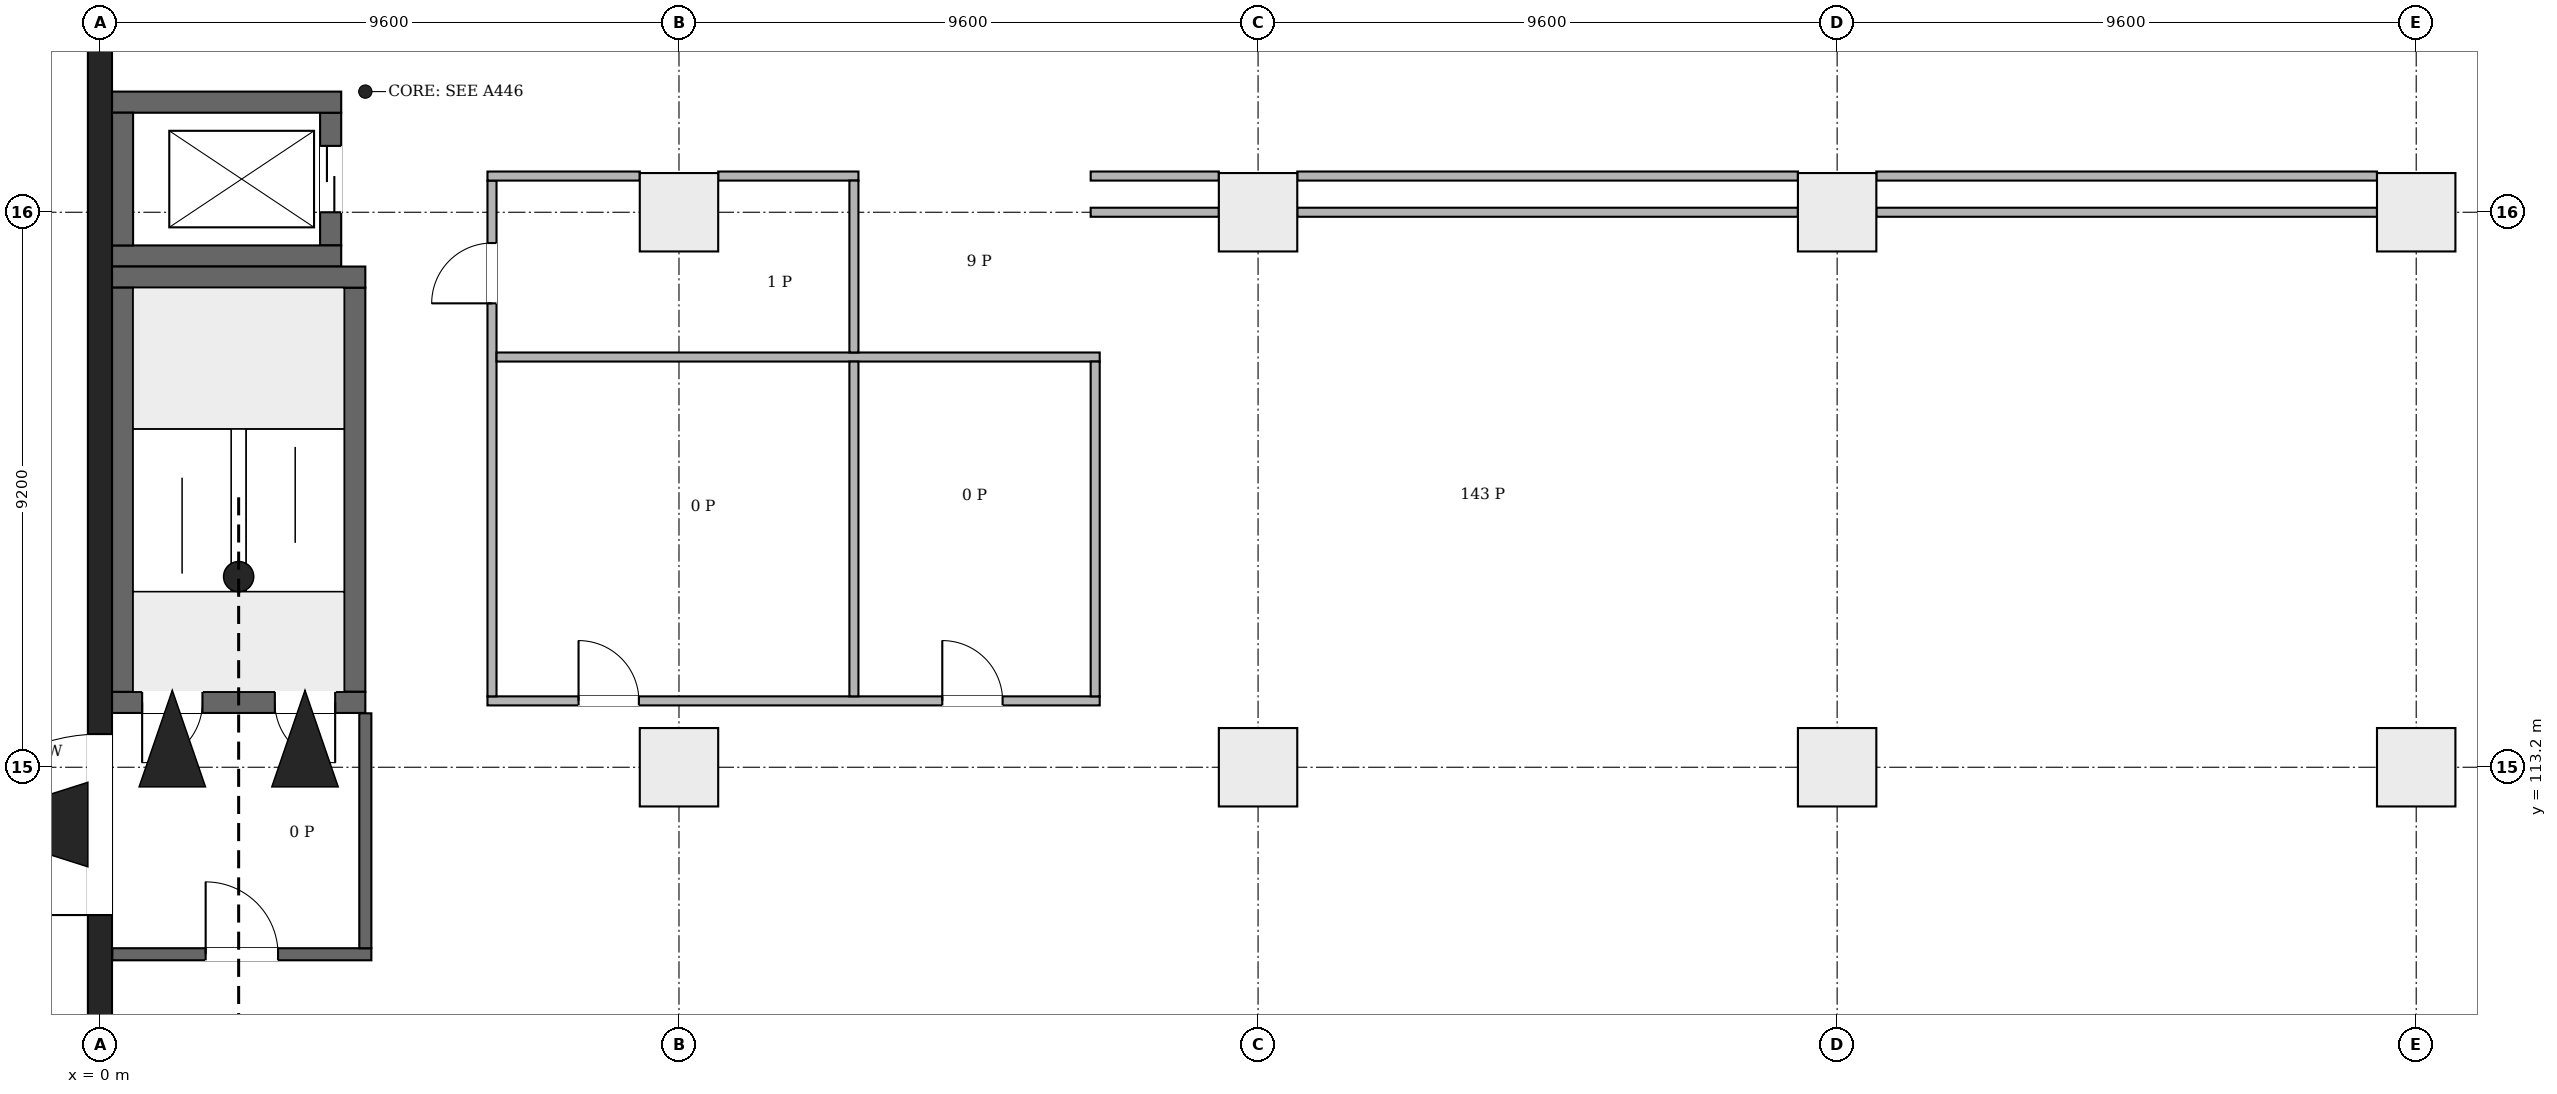
"""IFC4 building model, lengths in metres.
Left out: names, types, materials, properties, quantities, classifications, styles, units other than length and angle.
Written with IfcOpenShell. Run it as: python <this file> out.ifc"""

import sys

from ifc_helpers import new_model, si_unit, direction, frame, frame_2d, origin, origin_2d, place, context, subcontext, project, spatial, rectangle, extrude, element, fill, save


model = new_model("IFC4")
c1 = context("Model", 3, precision=1e-05, world=origin(), true_north=direction((0.0, 1.0)))
c2 = subcontext(c1, "Body", "Model", "MODEL_VIEW")
j1 = project(units=[si_unit("LENGTHUNIT", "METRE"), si_unit("PLANEANGLEUNIT", "RADIAN")], contexts=[c1])
p1 = place(None, origin())
s1 = spatial("IfcSite", under=j1, at=p1, CompositionType="ELEMENT")
p2 = place(p1, origin())
s2 = spatial("IfcBuilding", under=s1, at=p2, CompositionType="ELEMENT")
p3 = place(p2, origin())
s3 = spatial("IfcBuildingStorey", under=s2, at=p3, CompositionType="ELEMENT", Elevation=0.0)
p4 = place(p3, frame((0.0, 94.12, 0.0), z_axis=(0.0, 0.0, 1.0), x_axis=(0.0, 1.0, 0.0)))
e1 = element("IfcWall", 1, at=p4, inside=s3, PredefinedType="SHEAR", context=c2, shape_type="SweptSolid", body=[
    extrude(rectangle(XDim=46.88, YDim=0.4, at=frame_2d((23.44, 0.0))), origin(), (0.0, 0.0, 1.0), 6.5),
])
p5 = place(p4, frame((16.63, 0.0, 0.0)))
e2 = element("IfcOpeningElement", 2, at=p5, cuts=e1, PredefinedType="OPENING", context=c2, shape_type="SweptSolid", body=[
    extrude(rectangle(XDim=3.0, YDim=2.4, at=frame_2d((1.5, 1.2))), frame((0.0, 0.21, 0.0), z_axis=(0.0, -1.0, 0.0), x_axis=(1.0, 0.0, 0.0)), (0.0, 0.0, 1.0), 0.42),
])
p6 = place(p3, frame((0.2, 114.275, 0.0), z_axis=(0.0, 0.0, 1.0), x_axis=(1.0, 0.0, 0.0)))
e3 = element("IfcWall", 3, at=p6, inside=s3, PredefinedType="SHEAR", context=c2, shape_type="SweptSolid", body=[
    extrude(rectangle(XDim=4.2, YDim=0.35, at=frame_2d((2.1, 0.0))), origin(), (0.0, 0.0, 1.0), 6.5),
])
p7 = place(p6, frame((0.5, 0.0, 0.0)))
e4 = element("IfcOpeningElement", 4, at=p7, cuts=e3, PredefinedType="OPENING", context=c2, shape_type="SweptSolid", body=[
    extrude(rectangle(XDim=1.0, YDim=2.1, at=frame_2d((0.5, 1.05))), frame((0.0, 0.185, 0.0), z_axis=(0.0, -1.0, 0.0), x_axis=(1.0, 0.0, 0.0)), (0.0, 0.0, 1.0), 0.37),
])
p8 = place(p6, frame((2.7, 0.0, 0.0)))
e5 = element("IfcOpeningElement", 5, at=p8, cuts=e3, PredefinedType="OPENING", context=c2, shape_type="SweptSolid", body=[
    extrude(rectangle(XDim=1.0, YDim=2.1, at=frame_2d((0.5, 1.05))), frame((0.0, 0.185, 0.0), z_axis=(0.0, -1.0, 0.0), x_axis=(1.0, 0.0, 0.0)), (0.0, 0.0, 1.0), 0.37),
])
p9 = place(p3, frame((0.2, 121.325, 0.0), z_axis=(0.0, 0.0, 1.0), x_axis=(1.0, 0.0, 0.0)))
e6 = element("IfcWall", 6, at=p9, inside=s3, PredefinedType="SHEAR", context=c2, shape_type="SweptSolid", body=[
    extrude(rectangle(XDim=4.2, YDim=0.35, at=frame_2d((2.1, 0.0))), origin(), (0.0, 0.0, 1.0), 6.5),
])
for number, where, z_axis, x_axis in (
    (7, (0.375, 114.45, 0.0), (0.0, 0.0, 1.0), (0.0, 1.0, 0.0)),
    (8, (4.225, 114.45, 0.0), (0.0, 0.0, 1.0), (0.0, 1.0, 0.0)),
):
    element("IfcWall", number, at=place(p3, frame(where, z_axis=z_axis, x_axis=x_axis)), inside=s3, PredefinedType="SHEAR", context=c2, shape_type="SweptSolid", body=[
        extrude(rectangle(XDim=6.7, YDim=0.35, at=frame_2d((3.35, 0.0))), origin(), (0.0, 0.0, 1.0), 6.5),
    ])
for number, where, z_axis, x_axis in (
    (9, (0.2, 121.675, 0.0), (0.0, 0.0, 1.0), (1.0, 0.0, 0.0)),
    (10, (0.2, 124.225, 0.0), (0.0, 0.0, 1.0), (1.0, 0.0, 0.0)),
):
    element("IfcWall", number, at=place(p3, frame(where, z_axis=z_axis, x_axis=x_axis)), inside=s3, PredefinedType="SHEAR", context=c2, shape_type="SweptSolid", body=[
        extrude(rectangle(XDim=3.8, YDim=0.35, at=frame_2d((1.9, 0.0))), origin(), (0.0, 0.0, 1.0), 6.5),
    ])
p10 = place(p3, frame((0.375, 121.85, 0.0), z_axis=(0.0, 0.0, 1.0), x_axis=(0.0, 1.0, 0.0)))
e11 = element("IfcWall", 11, at=p10, inside=s3, PredefinedType="SHEAR", context=c2, shape_type="SweptSolid", body=[
    extrude(rectangle(XDim=2.2, YDim=0.35, at=frame_2d((1.1, 0.0))), origin(), (0.0, 0.0, 1.0), 6.5),
])
p11 = place(p3, frame((3.825, 121.85, 0.0), z_axis=(0.0, 0.0, 1.0), x_axis=(0.0, 1.0, 0.0)))
e12 = element("IfcWall", 12, at=p11, inside=s3, PredefinedType="SHEAR", context=c2, shape_type="SweptSolid", body=[
    extrude(rectangle(XDim=2.2, YDim=0.35, at=frame_2d((1.1, 0.0))), origin(), (0.0, 0.0, 1.0), 6.5),
])
p12 = place(p11, frame((0.55, 0.0, 0.0)))
e13 = element("IfcOpeningElement", 13, at=p12, cuts=e12, PredefinedType="OPENING", context=c2, shape_type="SweptSolid", body=[
    extrude(rectangle(XDim=1.1, YDim=2.1, at=frame_2d((0.55, 1.05))), frame((0.0, 0.185, 0.0), z_axis=(0.0, -1.0, 0.0), x_axis=(1.0, 0.0, 0.0)), (0.0, 0.0, 1.0), 0.37),
])
for number, where, z_axis, x_axis in (
    (14, (9.6, 113.2, 0.0), (0.0, 0.0, 1.0), (1.0, 0.0, 0.0)),
    (15, (19.2, 113.2, 0.0), (0.0, 0.0, 1.0), (1.0, 0.0, 0.0)),
    (16, (28.8, 113.2, 0.0), (0.0, 0.0, 1.0), (1.0, 0.0, 0.0)),
    (17, (38.4, 113.2, 0.0), (0.0, 0.0, 1.0), (1.0, 0.0, 0.0)),
    (18, (9.6, 122.4, 0.0), (0.0, 0.0, 1.0), (1.0, 0.0, 0.0)),
    (19, (19.2, 122.4, 0.0), (0.0, 0.0, 1.0), (1.0, 0.0, 0.0)),
    (20, (28.8, 122.4, 0.0), (0.0, 0.0, 1.0), (1.0, 0.0, 0.0)),
    (21, (38.4, 122.4, 0.0), (0.0, 0.0, 1.0), (1.0, 0.0, 0.0)),
):
    element("IfcColumn", number, at=place(p3, frame(where, z_axis=z_axis, x_axis=x_axis)), inside=s3, PredefinedType="COLUMN", context=c2, shape_type="SweptSolid", body=[
        extrude(rectangle(XDim=1.3, YDim=1.3, at=origin_2d()), origin(), (0.0, 0.0, 1.0), 6.5),
    ])
p13 = place(p3, frame((0.206, 110.1, 0.0), z_axis=(0.0, 0.0, 1.0), x_axis=(1.0, 0.0, 0.0)))
e22 = element("IfcWall", 22, at=p13, inside=s3, PredefinedType="PARTITIONING", context=c2, shape_type="SweptSolid", body=[
    extrude(rectangle(XDim=4.294, YDim=0.2, at=frame_2d((2.147, 0.0))), origin(), (0.0, 0.0, 1.0), 6.15),
])
p14 = place(p13, frame((1.547, 0.0, 0.0)))
e23 = element("IfcOpeningElement", 23, at=p14, cuts=e22, PredefinedType="OPENING", context=c2, shape_type="SweptSolid", body=[
    extrude(rectangle(XDim=1.2, YDim=2.1, at=frame_2d((0.6, 1.05))), frame((0.0, 0.11, 0.0), z_axis=(0.0, -1.0, 0.0), x_axis=(1.0, 0.0, 0.0)), (0.0, 0.0, 1.0), 0.22),
])
p15 = place(p3, frame((4.4, 110.2, 0.0), z_axis=(0.0, 0.0, 1.0), x_axis=(0.0, 1.0, 0.0)))
e24 = element("IfcWall", 24, at=p15, inside=s3, PredefinedType="PARTITIONING", context=c2, shape_type="SweptSolid", body=[
    extrude(rectangle(XDim=3.894, YDim=0.2, at=frame_2d((1.947, 0.0))), origin(), (0.0, 0.0, 1.0), 6.15),
])
p16 = place(p3, frame((6.425, 114.3, 0.0), z_axis=(0.0, 0.0, 1.0), x_axis=(1.0, 0.0, 0.0)))
e25 = element("IfcWall", 25, at=p16, inside=s3, PredefinedType="PARTITIONING", context=c2, shape_type="SweptSolid", body=[
    extrude(rectangle(XDim=10.15, YDim=0.15, at=frame_2d((5.075, 0.0))), origin(), (0.0, 0.0, 1.0), 6.15),
])
p17 = place(p16, frame((1.51, 0.0, 0.0)))
e26 = element("IfcOpeningElement", 26, at=p17, cuts=e25, PredefinedType="OPENING", context=c2, shape_type="SweptSolid", body=[
    extrude(rectangle(XDim=1.0, YDim=2.1, at=frame_2d((0.5, 1.05))), frame((0.0, 0.085, 0.0), z_axis=(0.0, -1.0, 0.0), x_axis=(1.0, 0.0, 0.0)), (0.0, 0.0, 1.0), 0.17),
])
p18 = place(p16, frame((7.54, 0.0, 0.0)))
e27 = element("IfcOpeningElement", 27, at=p18, cuts=e25, PredefinedType="OPENING", context=c2, shape_type="SweptSolid", body=[
    extrude(rectangle(XDim=1.0, YDim=2.1, at=frame_2d((0.5, 1.05))), frame((0.0, 0.085, 0.0), z_axis=(0.0, -1.0, 0.0), x_axis=(1.0, 0.0, 0.0)), (0.0, 0.0, 1.0), 0.17),
])
p19 = place(p3, frame((6.5, 114.375, 0.0), z_axis=(0.0, 0.0, 1.0), x_axis=(0.0, 1.0, 0.0)))
e28 = element("IfcWall", 28, at=p19, inside=s3, PredefinedType="PARTITIONING", context=c2, shape_type="SweptSolid", body=[
    extrude(rectangle(XDim=8.55, YDim=0.15, at=frame_2d((4.275, 0.0))), origin(), (0.0, 0.0, 1.0), 6.15),
])
p20 = place(p19, frame((6.515, 0.0, 0.0)))
e29 = element("IfcOpeningElement", 29, at=p20, cuts=e28, PredefinedType="OPENING", context=c2, shape_type="SweptSolid", body=[
    extrude(rectangle(XDim=1.0, YDim=2.1, at=frame_2d((0.5, 1.05))), frame((0.0, 0.085, 0.0), z_axis=(0.0, -1.0, 0.0), x_axis=(1.0, 0.0, 0.0)), (0.0, 0.0, 1.0), 0.17),
])
p21 = place(p3, frame((6.425, 123.0, 0.0), z_axis=(0.0, 0.0, 1.0), x_axis=(1.0, 0.0, 0.0)))
e30 = element("IfcWall", 30, at=p21, inside=s3, PredefinedType="PARTITIONING", context=c2, shape_type="SweptSolid", body=[
    extrude(rectangle(XDim=2.525, YDim=0.15, at=frame_2d((1.262, 0.0))), origin(), (0.0, 0.0, 1.0), 6.15),
])
p22 = place(p3, frame((6.575, 120.0, 0.0), z_axis=(0.0, 0.0, 1.0), x_axis=(1.0, 0.0, 0.0)))
e31 = element("IfcWall", 31, at=p22, inside=s3, PredefinedType="PARTITIONING", context=c2, shape_type="SweptSolid", body=[
    extrude(rectangle(XDim=10.0, YDim=0.15, at=frame_2d((5.0, 0.0))), origin(), (0.0, 0.0, 1.0), 6.15),
])
p23 = place(p3, frame((10.25, 123.0, 0.0), z_axis=(0.0, 0.0, 1.0), x_axis=(1.0, 0.0, 0.0)))
e32 = element("IfcWall", 32, at=p23, inside=s3, PredefinedType="PARTITIONING", context=c2, shape_type="SweptSolid", body=[
    extrude(rectangle(XDim=2.325, YDim=0.15, at=frame_2d((1.163, 0.0))), origin(), (0.0, 0.0, 1.0), 5.75),
])
p24 = place(p3, frame((12.5, 114.375, 0.0), z_axis=(0.0, 0.0, 1.0), x_axis=(0.0, 1.0, 0.0)))
e33 = element("IfcWall", 33, at=p24, inside=s3, PredefinedType="PARTITIONING", context=c2, shape_type="SweptSolid", body=[
    extrude(rectangle(XDim=5.55, YDim=0.15, at=frame_2d((2.775, 0.0))), origin(), (0.0, 0.0, 1.0), 6.15),
])
p25 = place(p3, frame((12.5, 120.075, 0.0), z_axis=(0.0, 0.0, 1.0), x_axis=(0.0, 1.0, 0.0)))
e34 = element("IfcWall", 34, at=p25, inside=s3, PredefinedType="PARTITIONING", context=c2, shape_type="SweptSolid", body=[
    extrude(rectangle(XDim=2.85, YDim=0.15, at=frame_2d((1.425, 0.0))), origin(), (0.0, 0.0, 1.0), 6.15),
])
p26 = place(p3, frame((16.5, 114.375, 0.0), z_axis=(0.0, 0.0, 1.0), x_axis=(0.0, 1.0, 0.0)))
e35 = element("IfcWall", 35, at=p26, inside=s3, PredefinedType="PARTITIONING", context=c2, shape_type="SweptSolid", body=[
    extrude(rectangle(XDim=5.55, YDim=0.15, at=frame_2d((2.775, 0.0))), origin(), (0.0, 0.0, 1.0), 6.15),
])
for number, where, z_axis, x_axis in (
    (36, (16.425, 122.4, 0.0), (0.0, 0.0, 1.0), (1.0, 0.0, 0.0)),
    (37, (16.425, 123.0, 0.0), (0.0, 0.0, 1.0), (1.0, 0.0, 0.0)),
):
    element("IfcWall", number, at=place(p3, frame(where, z_axis=z_axis, x_axis=x_axis)), inside=s3, PredefinedType="PARTITIONING", context=c2, shape_type="SweptSolid", body=[
        extrude(rectangle(XDim=2.125, YDim=0.15, at=frame_2d((1.062, 0.0))), origin(), (0.0, 0.0, 1.0), 5.75),
    ])
for number, where, z_axis, x_axis in (
    (38, (19.85, 122.4, 0.0), (0.0, 0.0, 1.0), (1.0, 0.0, 0.0)),
    (39, (19.85, 123.0, 0.0), (0.0, 0.0, 1.0), (1.0, 0.0, 0.0)),
):
    element("IfcWall", number, at=place(p3, frame(where, z_axis=z_axis, x_axis=x_axis)), inside=s3, PredefinedType="PARTITIONING", context=c2, shape_type="SweptSolid", body=[
        extrude(rectangle(XDim=8.3, YDim=0.15, at=frame_2d((4.15, 0.0))), origin(), (0.0, 0.0, 1.0), 5.75),
    ])
for number, where, z_axis, x_axis in (
    (40, (29.45, 122.4, 0.0), (0.0, 0.0, 1.0), (1.0, 0.0, 0.0)),
    (41, (29.45, 123.0, 0.0), (0.0, 0.0, 1.0), (1.0, 0.0, 0.0)),
):
    element("IfcWall", number, at=place(p3, frame(where, z_axis=z_axis, x_axis=x_axis)), inside=s3, PredefinedType="PARTITIONING", context=c2, shape_type="SweptSolid", body=[
        extrude(rectangle(XDim=8.3, YDim=0.15, at=frame_2d((4.15, 0.0))), origin(), (0.0, 0.0, 1.0), 5.75),
    ])
p27 = place(p5, origin())
e42 = element("IfcDoor", 42, at=p27, inside=s3, OperationType="DOUBLE_DOOR_SINGLE_SWING", PredefinedType="DOOR", context=c2, shape_type="SweptSolid", body=[
    extrude(rectangle(XDim=3.0, YDim=2.4, at=frame_2d((1.5, 1.2))), frame((0.0, 0.025, 0.0), z_axis=(0.0, -1.0, 0.0), x_axis=(1.0, 0.0, 0.0)), (0.0, 0.0, 1.0), 0.05),
])
fill(e2, e42)
p28 = place(p7, origin())
e43 = element("IfcDoor", 43, at=p28, inside=s3, OperationType="SINGLE_SWING_LEFT", PredefinedType="DOOR", context=c2, shape_type="SweptSolid", body=[
    extrude(rectangle(XDim=1.0, YDim=2.1, at=frame_2d((0.5, 1.05))), frame((0.0, 0.025, 0.0), z_axis=(0.0, -1.0, 0.0), x_axis=(1.0, 0.0, 0.0)), (0.0, 0.0, 1.0), 0.05),
])
fill(e4, e43)
p29 = place(p8, origin())
e44 = element("IfcDoor", 44, at=p29, inside=s3, OperationType="SINGLE_SWING_RIGHT", PredefinedType="DOOR", context=c2, shape_type="SweptSolid", body=[
    extrude(rectangle(XDim=1.0, YDim=2.1, at=frame_2d((0.5, 1.05))), frame((0.0, 0.025, 0.0), z_axis=(0.0, -1.0, 0.0), x_axis=(1.0, 0.0, 0.0)), (0.0, 0.0, 1.0), 0.05),
])
fill(e5, e44)
p30 = place(p12, origin())
e45 = element("IfcDoor", 45, at=p30, inside=s3, OperationType="DOUBLE_DOOR_SLIDING", PredefinedType="DOOR", context=c2, shape_type="SweptSolid", body=[
    extrude(rectangle(XDim=1.1, YDim=2.1, at=frame_2d((0.55, 1.05))), frame((0.0, 0.025, 0.0), z_axis=(0.0, -1.0, 0.0), x_axis=(1.0, 0.0, 0.0)), (0.0, 0.0, 1.0), 0.05),
])
fill(e13, e45)
p31 = place(p17, origin())
e46 = element("IfcDoor", 46, at=p31, inside=s3, OperationType="SINGLE_SWING_LEFT", PredefinedType="DOOR", context=c2, shape_type="SweptSolid", body=[
    extrude(rectangle(XDim=1.0, YDim=2.1, at=frame_2d((0.5, 1.05))), frame((0.0, 0.025, 0.0), z_axis=(0.0, -1.0, 0.0), x_axis=(1.0, 0.0, 0.0)), (0.0, 0.0, 1.0), 0.05),
])
fill(e26, e46)
p32 = place(p18, origin())
e47 = element("IfcDoor", 47, at=p32, inside=s3, OperationType="SINGLE_SWING_RIGHT", PredefinedType="DOOR", context=c2, shape_type="SweptSolid", body=[
    extrude(rectangle(XDim=1.0, YDim=2.1, at=frame_2d((0.5, 1.05))), frame((0.0, 0.025, 0.0), z_axis=(0.0, -1.0, 0.0), x_axis=(1.0, 0.0, 0.0)), (0.0, 0.0, 1.0), 0.05),
])
fill(e27, e47)
p33 = place(p20, origin())
e48 = element("IfcDoor", 48, at=p33, inside=s3, OperationType="SINGLE_SWING_LEFT", PredefinedType="DOOR", context=c2, shape_type="SweptSolid", body=[
    extrude(rectangle(XDim=1.0, YDim=2.1, at=frame_2d((0.5, 1.05))), frame((0.0, 0.025, 0.0), z_axis=(0.0, -1.0, 0.0), x_axis=(1.0, 0.0, 0.0)), (0.0, 0.0, 1.0), 0.05),
])
fill(e29, e48)
p34 = place(p14, origin())
e49 = element("IfcDoor", 49, at=p34, inside=s3, OperationType="SINGLE_SWING_RIGHT", PredefinedType="DOOR", context=c2, shape_type="SweptSolid", body=[
    extrude(rectangle(XDim=1.2, YDim=2.1, at=frame_2d((0.6, 1.05))), frame((0.0, 0.025, 0.0), z_axis=(0.0, -1.0, 0.0), x_axis=(1.0, 0.0, 0.0)), (0.0, 0.0, 1.0), 0.05),
])
fill(e23, e49)
save(model, sys.argv[1])
